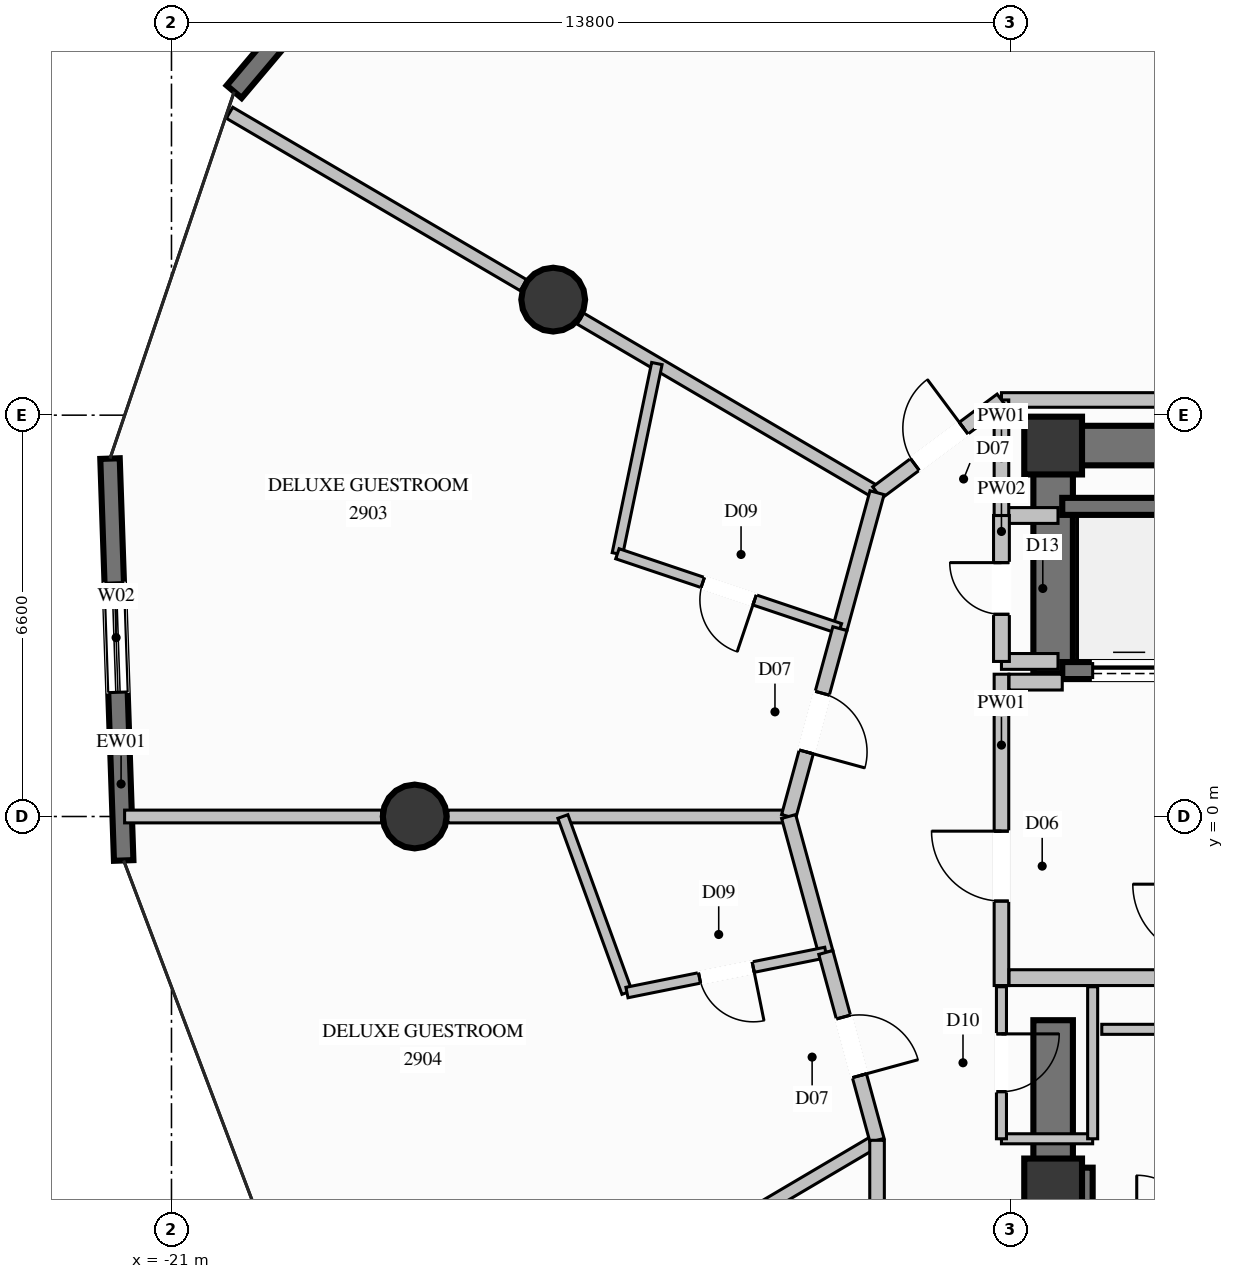
"""IFC4 building model, lengths in metres.
Left out: names, types, materials, properties, quantities, classifications, styles, units other than length and angle.
Written with IfcOpenShell. Run it as: python <this file> out.ifc"""

import sys

from ifc_helpers import new_model, si_unit, direction, frame, frame_2d, origin, origin_2d, place, context, subcontext, project, spatial, rectangle, circle, extrude, element, fill, save


model = new_model("IFC4")
c1 = context("Model", 3, precision=1e-05, world=origin(), true_north=direction((0.0, 1.0)))
c2 = subcontext(c1, "Body", "Model", "MODEL_VIEW")
j1 = project(units=[si_unit("LENGTHUNIT", "METRE"), si_unit("PLANEANGLEUNIT", "RADIAN")], contexts=[c1])
p1 = place(None, origin())
s1 = spatial("IfcSite", under=j1, at=p1, CompositionType="ELEMENT")
p2 = place(p1, origin())
s2 = spatial("IfcBuilding", under=s1, at=p2, CompositionType="ELEMENT")
p3 = place(p2, frame((0.0, 0.0, 109.8)))
s3 = spatial("IfcBuildingStorey", under=s2, at=p3, CompositionType="ELEMENT", Elevation=109.8)
for number, where, z_axis, x_axis in (
    (1, (-6.5, -6.1, 0.0), (0.0, 0.0, 1.0), (1.0, 0.0, 0.0)),
    (2, (-6.5, 6.1, 0.0), (0.0, 0.0, 1.0), (1.0, 0.0, 0.0)),
):
    element("IfcColumn", number, at=place(p3, frame(where, z_axis=z_axis, x_axis=x_axis)), inside=s3, PredefinedType="COLUMN", context=c2, shape_type="SweptSolid", body=[
        extrude(rectangle(XDim=0.95, YDim=0.95, at=origin_2d()), origin(), (0.0, 0.0, 1.0), 3.6),
    ])
p4 = place(p3, frame((-6.175, -6.1, 0.0), z_axis=(0.0, 0.0, 1.0), x_axis=(1.0, 0.0, 0.0)))
e3 = element("IfcWall", 3, at=p4, inside=s3, PredefinedType="SHEAR", context=c2, shape_type="SweptSolid", body=[
    extrude(rectangle(XDim=0.325, YDim=0.65, at=frame_2d((0.163, 0.0))), origin(), (0.0, 0.0, 1.0), 3.6),
])
p5 = place(p3, frame((-6.175, 6.1, 0.0), z_axis=(0.0, 0.0, 1.0), x_axis=(1.0, 0.0, 0.0)))
e4 = element("IfcWall", 4, at=p5, inside=s3, PredefinedType="SHEAR", context=c2, shape_type="SweptSolid", body=[
    extrude(rectangle(XDim=2.575, YDim=0.65, at=frame_2d((1.288, 0.0))), origin(), (0.0, 0.0, 1.0), 3.6),
])
p6 = place(p3, frame((-6.5, 2.35, 0.0), z_axis=(0.0, 0.0, 1.0), x_axis=(0.0, 1.0, 0.0)))
e5 = element("IfcWall", 5, at=p6, inside=s3, PredefinedType="SHEAR", context=c2, shape_type="SweptSolid", body=[
    extrude(rectangle(XDim=4.075, YDim=0.65, at=frame_2d((2.038, 0.0))), origin(), (0.0, 0.0, 1.0), 3.6),
])
p7 = place(p3, frame((-6.5, -6.425, 0.0), z_axis=(0.0, 0.0, 1.0), x_axis=(0.0, 1.0, 0.0)))
e6 = element("IfcWall", 6, at=p7, inside=s3, PredefinedType="SHEAR", context=c2, shape_type="SweptSolid", body=[
    extrude(rectangle(XDim=3.075, YDim=0.65, at=frame_2d((1.538, 0.0))), origin(), (0.0, 0.0, 1.0), 3.6),
])
for number, where, z_axis, x_axis in (
    (7, (-14.722, 8.5, 0.0), (0.0, 0.0, 1.0), (1.0, 0.0, 0.0)),
    (8, (-17.0, 0.0, 0.0), (0.0, 0.0, 1.0), (1.0, 0.0, 0.0)),
):
    element("IfcColumn", number, at=place(p3, frame(where, z_axis=z_axis, x_axis=x_axis)), inside=s3, PredefinedType="COLUMN", context=c2, shape_type="SweptSolid", body=[
        extrude(circle(Radius=0.525, at=origin_2d()), origin(), (0.0, 0.0, 1.0), 3.6),
    ])
p8 = place(p3, frame((-19.969, 11.919, 0.0), z_axis=(0.0, 0.0, 1.0), x_axis=(0.645278763483, 0.763947195425, 0.0)))
e9 = element("IfcWall", 9, at=p8, inside=s3, PredefinedType="SOLIDWALL", context=c2, shape_type="SweptSolid", body=[
    extrude(rectangle(XDim=6.369, YDim=0.32, at=frame_2d((3.185, 0.0))), origin(), (0.0, 0.0, 1.0), 3.35),
])
p9 = place(p8, frame((1.905, 0.0, 0.35)))
e10 = element("IfcOpeningElement", 10, at=p9, cuts=e9, PredefinedType="OPENING", context=c2, shape_type="SweptSolid", body=[
    extrude(rectangle(XDim=1.8, YDim=2.6, at=frame_2d((0.9, 1.3))), frame((0.0, 0.17, 0.0), z_axis=(0.0, -1.0, 0.0), x_axis=(1.0, 0.0, 0.0)), (0.0, 0.0, 1.0), 0.34),
])
p10 = place(p3, frame((-21.786, -0.723, 0.0), z_axis=(0.0, 0.0, 1.0), x_axis=(-0.034040106065, 0.999420467661, 0.0)))
e11 = element("IfcWall", 11, at=p10, inside=s3, PredefinedType="SOLIDWALL", context=c2, shape_type="SweptSolid", body=[
    extrude(rectangle(XDim=6.613, YDim=0.32, at=frame_2d((3.306, 0.0))), origin(), (0.0, 0.0, 1.0), 3.35),
])
p11 = place(p10, frame((2.767, 0.0, 0.35)))
e12 = element("IfcOpeningElement", 12, at=p11, cuts=e11, PredefinedType="OPENING", context=c2, shape_type="SweptSolid", body=[
    extrude(rectangle(XDim=1.8, YDim=2.6, at=frame_2d((0.9, 1.3))), frame((0.0, 0.17, 0.0), z_axis=(0.0, -1.0, 0.0), x_axis=(1.0, 0.0, 0.0)), (0.0, 0.0, 1.0), 0.34),
])
p12 = place(p3, frame((-6.35, 2.4, 0.0), z_axis=(0.0, 0.0, 1.0), x_axis=(1.0, 0.0, 0.0)))
e13 = element("IfcWall", 13, at=p12, inside=s3, PredefinedType="SOLIDWALL", context=c2, shape_type="SweptSolid", body=[
    extrude(rectangle(XDim=2.2, YDim=0.28, at=frame_2d((1.1, 0.0))), origin(), (0.0, 0.0, 1.0), 3.35),
])
p13 = place(p12, frame((0.5, 0.0, 0.0)))
e14 = element("IfcOpeningElement", 14, at=p13, cuts=e13, PredefinedType="OPENING", context=c2, shape_type="SweptSolid", body=[
    extrude(rectangle(XDim=1.2, YDim=2.2, at=frame_2d((0.6, 1.1))), frame((0.0, 0.15, 0.0), z_axis=(0.0, -1.0, 0.0), x_axis=(1.0, 0.0, 0.0)), (0.0, 0.0, 1.0), 0.3),
])
p14 = place(p3, frame((-4.15, 5.1, 0.0), z_axis=(0.0, 0.0, 1.0), x_axis=(-1.0, 0.0, 0.0)))
e15 = element("IfcWall", 15, at=p14, inside=s3, PredefinedType="SOLIDWALL", context=c2, shape_type="SweptSolid", body=[
    extrude(rectangle(XDim=2.2, YDim=0.28, at=frame_2d((1.1, 0.0))), origin(), (0.0, 0.0, 1.0), 3.35),
])
p15 = place(p3, frame((-7.35, -2.78, 0.0), z_axis=(0.0, 0.0, 1.0), x_axis=(0.0, 1.0, 0.0)))
e16 = element("IfcWall", 16, at=p15, inside=s3, PredefinedType="PARTITIONING", context=c2, shape_type="SweptSolid", body=[
    extrude(rectangle(XDim=5.12, YDim=0.24, at=frame_2d((2.56, 0.0))), origin(), (0.0, 0.0, 1.0), 2.435),
])
p16 = place(p15, frame((1.389, 0.0, 0.0)))
e17 = element("IfcOpeningElement", 17, at=p16, cuts=e16, PredefinedType="OPENING", context=c2, shape_type="SweptSolid", body=[
    extrude(rectangle(XDim=1.15, YDim=2.2, at=frame_2d((0.575, 1.1))), frame((0.0, 0.13, 0.0), z_axis=(0.0, -1.0, 0.0), x_axis=(1.0, 0.0, 0.0)), (0.0, 0.0, 1.0), 0.26),
])
p17 = place(p3, frame((-7.225, -2.65, 0.0), z_axis=(0.0, 0.0, 1.0), x_axis=(1.0, 0.0, 0.0)))
e18 = element("IfcWall", 18, at=p17, inside=s3, PredefinedType="PARTITIONING", context=c2, shape_type="SweptSolid", body=[
    extrude(rectangle(XDim=3.095, YDim=0.26, at=frame_2d((1.548, 0.0))), origin(), (0.0, 0.0, 1.0), 3.35),
])
p18 = place(p3, frame((-7.225, 2.21, 0.0), z_axis=(0.0, 0.0, 1.0), x_axis=(1.0, 0.0, 0.0)))
e19 = element("IfcWall", 19, at=p18, inside=s3, PredefinedType="PARTITIONING", context=c2, shape_type="SweptSolid", body=[
    extrude(rectangle(XDim=0.875, YDim=0.26, at=frame_2d((0.438, 0.0))), origin(), (0.0, 0.0, 1.0), 3.35),
])
for number, where, z_axis, x_axis in (
    (20, (-7.35, 4.95, 0.0), (0.0, 0.0, 1.0), (1.0, 0.0, 0.0)),
    (21, (-7.35, 2.55, 0.0), (0.0, 0.0, 1.0), (1.0, 0.0, 0.0)),
):
    element("IfcWall", number, at=place(p3, frame(where, z_axis=z_axis, x_axis=x_axis)), inside=s3, PredefinedType="PARTITIONING", context=c2, shape_type="SweptSolid", body=[
        extrude(rectangle(XDim=0.93, YDim=0.26, at=frame_2d((0.465, 0.0))), origin(), (0.0, 0.0, 1.0), 3.35),
    ])
p19 = place(p3, frame((-7.35, 2.55, 0.0), z_axis=(0.0, 0.0, 1.0), x_axis=(0.0, 1.0, 0.0)))
e22 = element("IfcWall", 22, at=p19, inside=s3, PredefinedType="PARTITIONING", context=c2, shape_type="SweptSolid", body=[
    extrude(rectangle(XDim=2.4, YDim=0.26, at=frame_2d((1.2, 0.0))), origin(), (0.0, 0.0, 1.0), 2.435),
])
p20 = place(p19, frame((0.775, 0.0, 0.0)))
e23 = element("IfcOpeningElement", 23, at=p20, cuts=e22, PredefinedType="OPENING", context=c2, shape_type="SweptSolid", body=[
    extrude(rectangle(XDim=0.85, YDim=2.05, at=frame_2d((0.425, 1.025))), frame((0.0, 0.14, 0.0), z_axis=(0.0, -1.0, 0.0), x_axis=(1.0, 0.0, 0.0)), (0.0, 0.0, 1.0), 0.28),
])
p21 = place(p3, frame((-7.35, 6.85, 0.0), z_axis=(0.0, 0.0, 1.0), x_axis=(1.0, 0.0, 0.0)))
e24 = element("IfcWall", 24, at=p21, inside=s3, PredefinedType="PARTITIONING", context=c2, shape_type="SweptSolid", body=[
    extrude(rectangle(XDim=14.7, YDim=0.24, at=frame_2d((7.35, 0.0))), origin(), (0.0, 0.0, 1.0), 2.435),
])
p22 = place(p3, frame((-7.35, 4.95, 0.0), z_axis=(0.0, 0.0, 1.0), x_axis=(0.0, 1.0, 0.0)))
e25 = element("IfcWall", 25, at=p22, inside=s3, PredefinedType="PARTITIONING", context=c2, shape_type="SweptSolid", body=[
    extrude(rectangle(XDim=1.9, YDim=0.24, at=frame_2d((0.95, 0.0))), origin(), (0.0, 0.0, 1.0), 2.435),
])
p23 = place(p3, frame((-7.35, -5.3, 0.0), z_axis=(0.0, 0.0, 1.0), x_axis=(1.0, 0.0, 0.0)))
e26 = element("IfcWall", 26, at=p23, inside=s3, PredefinedType="PARTITIONING", context=c2, shape_type="SweptSolid", body=[
    extrude(rectangle(XDim=1.5, YDim=0.165, at=frame_2d((0.75, 0.0))), origin(), (0.0, 0.0, 1.0), 2.435),
])
p24 = place(p3, frame((-5.85, -5.3, 0.0), z_axis=(0.0, 0.0, 1.0), x_axis=(0.0, 1.0, 0.0)))
e27 = element("IfcWall", 27, at=p24, inside=s3, PredefinedType="PARTITIONING", context=c2, shape_type="SweptSolid", body=[
    extrude(rectangle(XDim=2.5, YDim=0.165, at=frame_2d((1.25, 0.0))), origin(), (0.0, 0.0, 1.0), 2.435),
])
p25 = place(p3, frame((-7.35, -2.8, 0.0), z_axis=(0.0, 0.0, 1.0), x_axis=(0.0, -1.0, 0.0)))
e28 = element("IfcWall", 28, at=p25, inside=s3, PredefinedType="PARTITIONING", context=c2, shape_type="SweptSolid", body=[
    extrude(rectangle(XDim=2.5, YDim=0.165, at=frame_2d((1.25, 0.0))), origin(), (0.0, 0.0, 1.0), 3.35),
])
p26 = place(p25, frame((0.775, 0.0, 0.0)))
e29 = element("IfcOpeningElement", 29, at=p26, cuts=e28, PredefinedType="OPENING", context=c2, shape_type="SweptSolid", body=[
    extrude(rectangle(XDim=0.95, YDim=2.1, at=frame_2d((0.475, 1.05))), frame((0.0, 0.093, 0.0), z_axis=(0.0, -1.0, 0.0), x_axis=(1.0, 0.0, 0.0)), (0.0, 0.0, 1.0), 0.185),
])
p27 = place(p3, frame((-3.6, -3.5, 0.0), z_axis=(0.0, 0.0, 1.0), x_axis=(-1.0, 0.0, 0.0)))
e30 = element("IfcWall", 30, at=p27, inside=s3, PredefinedType="PARTITIONING", context=c2, shape_type="SweptSolid", body=[
    extrude(rectangle(XDim=2.1, YDim=0.165, at=frame_2d((1.05, 0.0))), origin(), (0.0, 0.0, 1.0), 3.35),
])
p28 = place(p3, frame((-9.396, 5.325, 0.0), z_axis=(0.0, 0.0, 1.0), x_axis=(-0.862467386777, 0.50611264235, 0.0)))
e31 = element("IfcWall", 31, at=p28, inside=s3, PredefinedType="PARTITIONING", context=c2, shape_type="SweptSolid", body=[
    extrude(rectangle(XDim=5.657, YDim=0.21, at=frame_2d((2.829, 0.0))), origin(), (0.0, 0.0, 1.0), 2.791),
])
p29 = place(p3, frame((-15.212, 8.738, 0.0), z_axis=(0.0, 0.0, 1.0), x_axis=(-0.862556345738, 0.505961016706, 0.0)))
e32 = element("IfcWall", 32, at=p29, inside=s3, PredefinedType="PARTITIONING", context=c2, shape_type="SweptSolid", body=[
    extrude(rectangle(XDim=5.603, YDim=0.21, at=frame_2d((2.802, 0.0))), origin(), (0.0, 0.0, 1.0), 3.35),
])
p30 = place(p3, frame((-10.85, 0.0, 0.0), z_axis=(0.0, 0.0, 1.0), x_axis=(-1.0, 0.0, 0.0)))
e33 = element("IfcWall", 33, at=p30, inside=s3, PredefinedType="PARTITIONING", context=c2, shape_type="SweptSolid", body=[
    extrude(rectangle(XDim=5.605, YDim=0.21, at=frame_2d((2.802, 0.0))), origin(), (0.0, 0.0, 1.0), 3.35),
])
p31 = place(p3, frame((-17.545, 0.0, 0.0), z_axis=(0.0, 0.0, 1.0), x_axis=(-1.0, 0.0, 0.0)))
e34 = element("IfcWall", 34, at=p31, inside=s3, PredefinedType="PARTITIONING", context=c2, shape_type="SweptSolid", body=[
    extrude(rectangle(XDim=4.226, YDim=0.21, at=frame_2d((2.113, 0.0))), origin(), (0.0, 0.0, 1.0), 3.35),
])
p32 = place(p3, frame((-9.396, -5.325, 0.0), z_axis=(0.0, 0.0, 1.0), x_axis=(-0.861187639937, -0.508287171607, 0.0)))
e35 = element("IfcWall", 35, at=p32, inside=s3, PredefinedType="PARTITIONING", context=c2, shape_type="SweptSolid", body=[
    extrude(rectangle(XDim=5.656, YDim=0.21, at=frame_2d((2.828, 0.0))), origin(), (0.0, 0.0, 1.0), 2.791),
])
p33 = place(p3, frame((-9.396, 5.325, 0.0), z_axis=(0.0, 0.0, 1.0), x_axis=(0.8017416961, 0.597670689205, 0.0)))
e36 = element("IfcWall", 36, at=p33, inside=s3, PredefinedType="PARTITIONING", context=c2, shape_type="SweptSolid", body=[
    extrude(rectangle(XDim=2.552, YDim=0.24, at=frame_2d((1.276, 0.0))), origin(), (0.0, 0.0, 1.0), 3.35),
])
p34 = place(p33, frame((0.776, 0.0, 0.0)))
e37 = element("IfcOpeningElement", 37, at=p34, cuts=e36, PredefinedType="OPENING", context=c2, shape_type="SweptSolid", body=[
    extrude(rectangle(XDim=1.0, YDim=2.2, at=frame_2d((0.5, 1.1))), frame((0.0, 0.13, 0.0), z_axis=(0.0, -1.0, 0.0), x_axis=(1.0, 0.0, 0.0)), (0.0, 0.0, 1.0), 0.26),
])
p35 = place(p3, frame((-9.396, 5.325, 0.0), z_axis=(0.0, 0.0, 1.0), x_axis=(-0.263643210908, -0.964620265878, 0.0)))
e38 = element("IfcWall", 38, at=p35, inside=s3, PredefinedType="PARTITIONING", context=c2, shape_type="SweptSolid", body=[
    extrude(rectangle(XDim=2.318, YDim=0.24, at=frame_2d((1.159, 0.0))), origin(), (0.0, 0.0, 1.0), 3.35),
])
p36 = place(p3, frame((-13.017, 7.449, 0.0), z_axis=(0.0, 0.0, 1.0), x_axis=(-0.203136275653, -0.979150475419, 0.0)))
e39 = element("IfcWall", 39, at=p36, inside=s3, PredefinedType="PLUMBINGWALL", context=c2, shape_type="SweptSolid", body=[
    extrude(rectangle(XDim=3.195, YDim=0.175, at=frame_2d((1.597, 0.0))), origin(), (0.0, 0.0, 1.0), 3.35),
])
p37 = place(p3, frame((-10.007, 3.089, 0.0), z_axis=(0.0, 0.0, 1.0), x_axis=(-0.947724103288, 0.319090933822, 0.0)))
e40 = element("IfcWall", 40, at=p37, inside=s3, PredefinedType="PLUMBINGWALL", context=c2, shape_type="SweptSolid", body=[
    extrude(rectangle(XDim=3.861, YDim=0.175, at=frame_2d((1.93, 0.0))), origin(), (0.0, 0.0, 1.0), 3.35),
])
p38 = place(p37, frame((1.48, 0.0, 0.0)))
e41 = element("IfcOpeningElement", 41, at=p38, cuts=e40, PredefinedType="OPENING", context=c2, shape_type="SweptSolid", body=[
    extrude(rectangle(XDim=0.9, YDim=2.1, at=frame_2d((0.45, 1.05))), frame((0.0, 0.098, 0.0), z_axis=(0.0, -1.0, 0.0), x_axis=(1.0, 0.0, 0.0)), (0.0, 0.0, 1.0), 0.195),
])
p39 = place(p3, frame((-10.007, 3.089, 0.0), z_axis=(0.0, 0.0, 1.0), x_axis=(-0.263272237376, -0.964721581093, 0.0)))
e42 = element("IfcWall", 42, at=p39, inside=s3, PredefinedType="PARTITIONING", context=c2, shape_type="SweptSolid", body=[
    extrude(rectangle(XDim=3.202, YDim=0.24, at=frame_2d((1.601, 0.0))), origin(), (0.0, 0.0, 1.0), 3.35),
])
p40 = place(p39, frame((1.101, 0.0, 0.0)))
e43 = element("IfcOpeningElement", 43, at=p40, cuts=e42, PredefinedType="OPENING", context=c2, shape_type="SweptSolid", body=[
    extrude(rectangle(XDim=1.0, YDim=2.2, at=frame_2d((0.5, 1.1))), frame((0.0, 0.13, 0.0), z_axis=(0.0, -1.0, 0.0), x_axis=(1.0, 0.0, 0.0)), (0.0, 0.0, 1.0), 0.26),
])
p41 = place(p3, frame((-10.85, 0.0, 0.0), z_axis=(0.0, 0.0, 1.0), x_axis=(0.263616426241, -0.964627586074, 0.0)))
e44 = element("IfcWall", 44, at=p41, inside=s3, PredefinedType="PARTITIONING", context=c2, shape_type="SweptSolid", body=[
    extrude(rectangle(XDim=2.318, YDim=0.24, at=frame_2d((1.159, 0.0))), origin(), (0.0, 0.0, 1.0), 3.35),
])
p42 = place(p3, frame((-14.563, 0.0, 0.0), z_axis=(0.0, 0.0, 1.0), x_axis=(0.342092982083, -0.939666106449, 0.0)))
e45 = element("IfcWall", 45, at=p42, inside=s3, PredefinedType="PLUMBINGWALL", context=c2, shape_type="SweptSolid", body=[
    extrude(rectangle(XDim=3.081, YDim=0.175, at=frame_2d((1.541, 0.0))), origin(), (0.0, 0.0, 1.0), 3.35),
])
p43 = place(p3, frame((-10.239, -2.236, 0.0), z_axis=(0.0, 0.0, 1.0), x_axis=(-0.980295333609, -0.197537487338, 0.0)))
e46 = element("IfcWall", 46, at=p43, inside=s3, PredefinedType="PLUMBINGWALL", context=c2, shape_type="SweptSolid", body=[
    extrude(rectangle(XDim=3.336, YDim=0.175, at=frame_2d((1.668, 0.0))), origin(), (0.0, 0.0, 1.0), 3.35),
])
p44 = place(p43, frame((1.218, 0.0, 0.0)))
e47 = element("IfcOpeningElement", 47, at=p44, cuts=e46, PredefinedType="OPENING", context=c2, shape_type="SweptSolid", body=[
    extrude(rectangle(XDim=0.9, YDim=2.1, at=frame_2d((0.45, 1.05))), frame((0.0, 0.098, 0.0), z_axis=(0.0, -1.0, 0.0), x_axis=(1.0, 0.0, 0.0)), (0.0, 0.0, 1.0), 0.195),
])
p45 = place(p3, frame((-10.239, -2.236, 0.0), z_axis=(0.0, 0.0, 1.0), x_axis=(0.26329160366, -0.964716295831, 0.0)))
e48 = element("IfcWall", 48, at=p45, inside=s3, PredefinedType="PARTITIONING", context=c2, shape_type="SweptSolid", body=[
    extrude(rectangle(XDim=3.202, YDim=0.24, at=frame_2d((1.601, 0.0))), origin(), (0.0, 0.0, 1.0), 3.35),
])
p46 = place(p45, frame((1.101, 0.0, 0.0)))
e49 = element("IfcOpeningElement", 49, at=p46, cuts=e48, PredefinedType="OPENING", context=c2, shape_type="SweptSolid", body=[
    extrude(rectangle(XDim=1.0, YDim=2.2, at=frame_2d((0.5, 1.1))), frame((0.0, 0.13, 0.0), z_axis=(0.0, -1.0, 0.0), x_axis=(1.0, 0.0, 0.0)), (0.0, 0.0, 1.0), 0.26),
])
p47 = place(p3, frame((-9.396, -5.325, 0.0), z_axis=(0.0, 0.0, 1.0), x_axis=(0.0, -1.0, 0.0)))
e50 = element("IfcWall", 50, at=p47, inside=s3, PredefinedType="PARTITIONING", context=c2, shape_type="SweptSolid", body=[
    extrude(rectangle(XDim=3.425, YDim=0.24, at=frame_2d((1.712, 0.0))), origin(), (0.0, 0.0, 1.0), 3.35),
])
p48 = place(p11, origin())
e51 = element("IfcWindow", 51, at=p48, inside=s3, PartitioningType="SINGLE_PANEL", PredefinedType="WINDOW", context=c2, shape_type="SweptSolid", body=[
    extrude(rectangle(XDim=1.8, YDim=2.6, at=frame_2d((0.9, 1.3))), frame((0.0, 0.03, 0.0), z_axis=(0.0, -1.0, 0.0), x_axis=(1.0, 0.0, 0.0)), (0.0, 0.0, 1.0), 0.06),
])
fill(e12, e51)
p49 = place(p13, origin())
e52 = element("IfcDoor", 52, at=p49, inside=s3, OperationType="SLIDING_TO_LEFT", PredefinedType="DOOR", context=c2, shape_type="SweptSolid", body=[
    extrude(rectangle(XDim=1.2, YDim=2.2, at=frame_2d((0.6, 1.1))), frame((0.0, 0.025, 0.0), z_axis=(0.0, -1.0, 0.0), x_axis=(1.0, 0.0, 0.0)), (0.0, 0.0, 1.0), 0.05),
])
fill(e14, e52)
p50 = place(p16, origin())
e53 = element("IfcDoor", 53, at=p50, inside=s3, OperationType="SINGLE_SWING_RIGHT", PredefinedType="DOOR", context=c2, shape_type="SweptSolid", body=[
    extrude(rectangle(XDim=1.15, YDim=2.2, at=frame_2d((0.575, 1.1))), frame((0.0, 0.025, 0.0), z_axis=(0.0, -1.0, 0.0), x_axis=(1.0, 0.0, 0.0)), (0.0, 0.0, 1.0), 0.05),
])
fill(e17, e53)
p51 = place(p20, origin())
e54 = element("IfcDoor", 54, at=p51, inside=s3, OperationType="SINGLE_SWING_RIGHT", PredefinedType="DOOR", context=c2, shape_type="SweptSolid", body=[
    extrude(rectangle(XDim=0.85, YDim=2.05, at=frame_2d((0.425, 1.025))), frame((0.0, 0.025, 0.0), z_axis=(0.0, -1.0, 0.0), x_axis=(1.0, 0.0, 0.0)), (0.0, 0.0, 1.0), 0.05),
])
fill(e23, e54)
p52 = place(p26, origin())
e55 = element("IfcDoor", 55, at=p52, inside=s3, OperationType="SINGLE_SWING_LEFT", PredefinedType="DOOR", context=c2, shape_type="SweptSolid", body=[
    extrude(rectangle(XDim=0.95, YDim=2.1, at=frame_2d((0.475, 1.05))), frame((0.0, 0.025, 0.0), z_axis=(0.0, -1.0, 0.0), x_axis=(1.0, 0.0, 0.0)), (0.0, 0.0, 1.0), 0.05),
])
fill(e29, e55)
p53 = place(p34, origin())
e56 = element("IfcDoor", 56, at=p53, inside=s3, OperationType="SINGLE_SWING_RIGHT", PredefinedType="DOOR", context=c2, shape_type="SweptSolid", body=[
    extrude(rectangle(XDim=1.0, YDim=2.2, at=frame_2d((0.5, 1.1))), frame((0.0, 0.025, 0.0), z_axis=(0.0, -1.0, 0.0), x_axis=(1.0, 0.0, 0.0)), (0.0, 0.0, 1.0), 0.05),
])
fill(e37, e56)
p54 = place(p38, origin())
e57 = element("IfcDoor", 57, at=p54, inside=s3, OperationType="SINGLE_SWING_LEFT", PredefinedType="DOOR", context=c2, shape_type="SweptSolid", body=[
    extrude(rectangle(XDim=0.9, YDim=2.1, at=frame_2d((0.45, 1.05))), frame((0.0, 0.025, 0.0), z_axis=(0.0, -1.0, 0.0), x_axis=(1.0, 0.0, 0.0)), (0.0, 0.0, 1.0), 0.05),
])
fill(e41, e57)
p55 = place(p40, origin())
e58 = element("IfcDoor", 58, at=p55, inside=s3, OperationType="SINGLE_SWING_RIGHT", PredefinedType="DOOR", context=c2, shape_type="SweptSolid", body=[
    extrude(rectangle(XDim=1.0, YDim=2.2, at=frame_2d((0.5, 1.1))), frame((0.0, 0.025, 0.0), z_axis=(0.0, -1.0, 0.0), x_axis=(1.0, 0.0, 0.0)), (0.0, 0.0, 1.0), 0.05),
])
fill(e43, e58)
p56 = place(p44, origin())
e59 = element("IfcDoor", 59, at=p56, inside=s3, OperationType="SINGLE_SWING_LEFT", PredefinedType="DOOR", context=c2, shape_type="SweptSolid", body=[
    extrude(rectangle(XDim=0.9, YDim=2.1, at=frame_2d((0.45, 1.05))), frame((0.0, 0.025, 0.0), z_axis=(0.0, -1.0, 0.0), x_axis=(1.0, 0.0, 0.0)), (0.0, 0.0, 1.0), 0.05),
])
fill(e47, e59)
p57 = place(p46, origin())
e60 = element("IfcDoor", 60, at=p57, inside=s3, OperationType="SINGLE_SWING_RIGHT", PredefinedType="DOOR", context=c2, shape_type="SweptSolid", body=[
    extrude(rectangle(XDim=1.0, YDim=2.2, at=frame_2d((0.5, 1.1))), frame((0.0, 0.025, 0.0), z_axis=(0.0, -1.0, 0.0), x_axis=(1.0, 0.0, 0.0)), (0.0, 0.0, 1.0), 0.05),
])
fill(e49, e60)
save(model, sys.argv[1])
